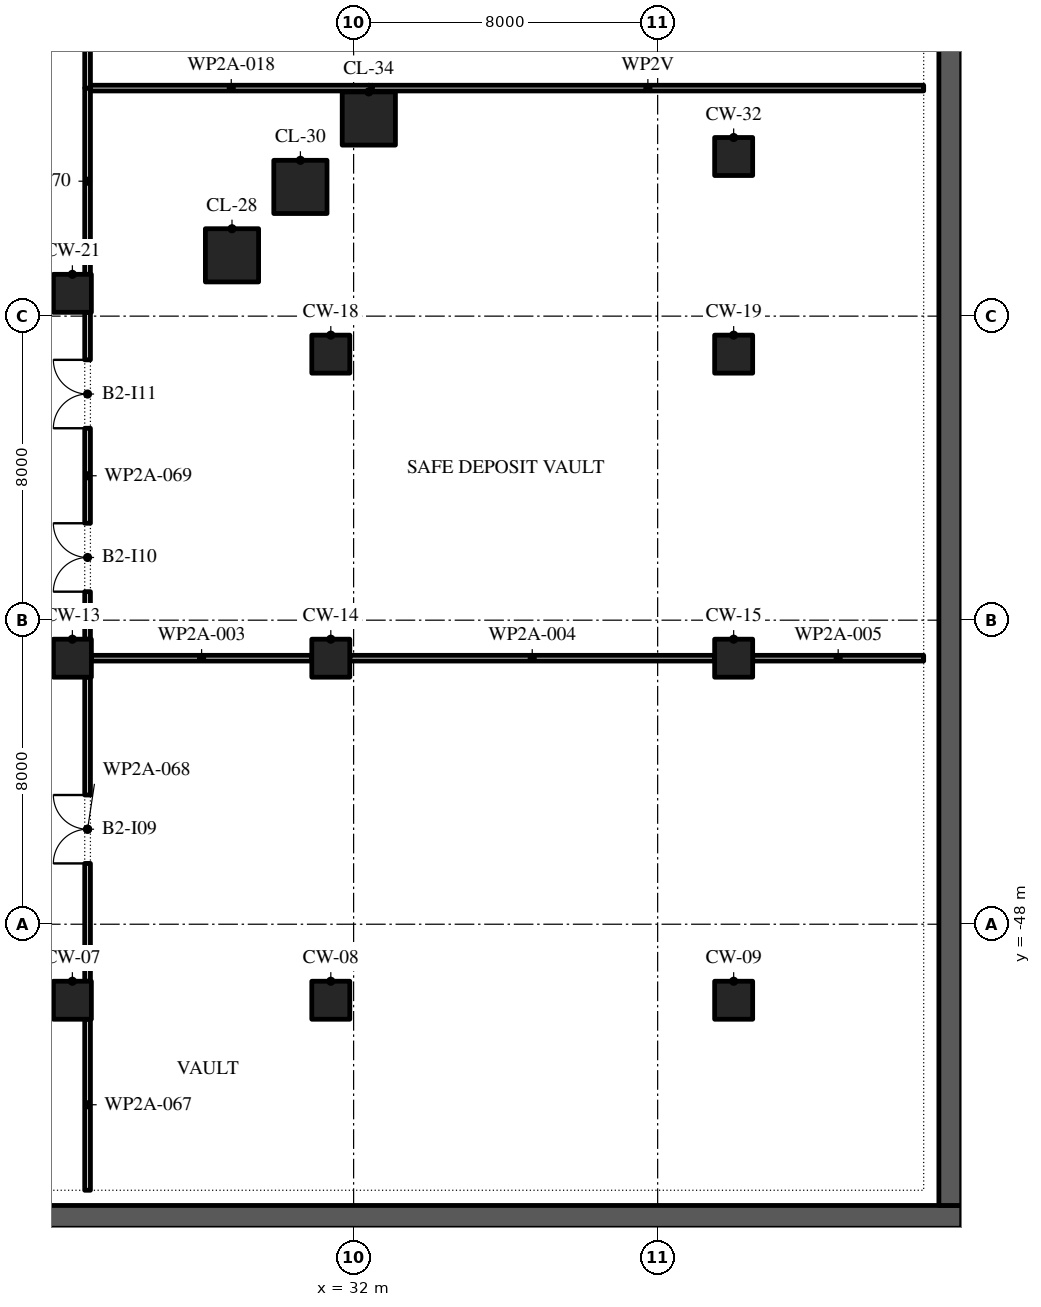
"""IFC4 building model, lengths in metres.
Left out: names, types, materials, properties, quantities, classifications, styles, units other than length and angle.
Written with IfcOpenShell. Run it as: python <this file> out.ifc"""

import sys

from ifc_helpers import new_model, si_unit, direction, frame, frame_2d, origin, origin_2d, place, context, subcontext, project, spatial, rectangle, extrude, element, fill, save


model = new_model("IFC4")
c1 = context("Model", 3, precision=1e-05, world=origin(), true_north=direction((0.0, 1.0)))
c2 = subcontext(c1, "Body", "Model", "MODEL_VIEW")
j1 = project(units=[si_unit("LENGTHUNIT", "METRE"), si_unit("PLANEANGLEUNIT", "RADIAN")], contexts=[c1])
p1 = place(None, origin())
s1 = spatial("IfcSite", under=j1, at=p1, CompositionType="ELEMENT")
p2 = place(p1, origin())
s2 = spatial("IfcBuilding", under=s1, at=p2, CompositionType="ELEMENT")
p3 = place(p2, frame((0.0, 0.0, -10.4)))
s3 = spatial("IfcBuildingStorey", under=s2, at=p3, CompositionType="ELEMENT", Elevation=-10.4)
p4 = place(p3, frame((-48.0, -55.7, -0.3), z_axis=(0.0, 0.0, 1.0), x_axis=(1.0, 0.0, 0.0)))
e1 = element("IfcWall", 1, at=p4, inside=s3, PredefinedType="SOLIDWALL", context=c2, shape_type="SweptSolid", body=[
    extrude(rectangle(XDim=96.0, YDim=0.6, at=frame_2d((48.0, 0.0))), origin(), (0.0, 0.0, 1.0), 5.5),
])
p5 = place(p3, frame((47.7, -55.4, -0.3), z_axis=(0.0, 0.0, 1.0), x_axis=(0.0, 1.0, 0.0)))
e2 = element("IfcWall", 2, at=p5, inside=s3, PredefinedType="SOLIDWALL", context=c2, shape_type="SweptSolid", body=[
    extrude(rectangle(XDim=94.8, YDim=0.6, at=frame_2d((47.4, 0.0))), origin(), (0.0, 0.0, 1.0), 5.5),
])
for number, where, z_axis, x_axis in (
    (3, (24.6, -50.0, -0.3), (0.0, 0.0, 1.0), (1.0, 0.0, 0.0)),
    (4, (31.4, -50.0, -0.3), (0.0, 0.0, 1.0), (1.0, 0.0, 0.0)),
    (5, (42.0, -50.0, -0.3), (0.0, 0.0, 1.0), (1.0, 0.0, 0.0)),
    (6, (24.6, -41.0, -0.3), (0.0, 0.0, 1.0), (1.0, 0.0, 0.0)),
    (7, (31.4, -41.0, -0.3), (0.0, 0.0, 1.0), (1.0, 0.0, 0.0)),
    (8, (42.0, -41.0, -0.3), (0.0, 0.0, 1.0), (1.0, 0.0, 0.0)),
    (9, (31.4, -33.0, -0.3), (0.0, 0.0, 1.0), (1.0, 0.0, 0.0)),
    (10, (42.0, -33.0, -0.3), (0.0, 0.0, 1.0), (1.0, 0.0, 0.0)),
    (11, (24.6, -31.4, -0.3), (0.0, 0.0, 1.0), (1.0, 0.0, 0.0)),
):
    element("IfcColumn", number, at=place(p3, frame(where, z_axis=z_axis, x_axis=x_axis)), inside=s3, PredefinedType="COLUMN", context=c2, shape_type="SweptSolid", body=[
        extrude(rectangle(XDim=1.0, YDim=1.0, at=origin_2d()), origin(), (0.0, 0.0, 1.0), 5.5),
    ])
for number, where, z_axis, x_axis in (
    (12, (28.8, -30.4, -0.3), (0.0, 0.0, 1.0), (1.0, 0.0, 0.0)),
    (13, (30.6, -28.6, -0.3), (0.0, 0.0, 1.0), (1.0, 0.0, 0.0)),
):
    element("IfcColumn", number, at=place(p3, frame(where, z_axis=z_axis, x_axis=x_axis)), inside=s3, PredefinedType="COLUMN", context=c2, shape_type="SweptSolid", body=[
        extrude(rectangle(XDim=1.4, YDim=1.4, at=origin_2d()), origin(), (0.0, 0.0, 1.0), 5.5),
    ])
p6 = place(p3, frame((42.0, -27.8, -0.3), z_axis=(0.0, 0.0, 1.0), x_axis=(1.0, 0.0, 0.0)))
e14 = element("IfcColumn", 14, at=p6, inside=s3, PredefinedType="COLUMN", context=c2, shape_type="SweptSolid", body=[
    extrude(rectangle(XDim=1.0, YDim=1.0, at=origin_2d()), origin(), (0.0, 0.0, 1.0), 5.5),
])
p7 = place(p3, frame((32.4, -26.8, -0.3), z_axis=(0.0, 0.0, 1.0), x_axis=(1.0, 0.0, 0.0)))
e15 = element("IfcColumn", 15, at=p7, inside=s3, PredefinedType="COLUMN", context=c2, shape_type="SweptSolid", body=[
    extrude(rectangle(XDim=1.4, YDim=1.4, at=origin_2d()), origin(), (0.0, 0.0, 1.0), 5.5),
])
p8 = place(p3, frame((25.1, -41.0, 0.0), z_axis=(0.0, 0.0, 1.0), x_axis=(1.0, 0.0, 0.0)))
e16 = element("IfcWall", 16, at=p8, inside=s3, PredefinedType="PARTITIONING", context=c2, shape_type="SweptSolid", body=[
    extrude(rectangle(XDim=5.8, YDim=0.15, at=frame_2d((2.9, 0.0))), origin(), (0.0, 0.0, 1.0), 4.9),
])
p9 = place(p3, frame((31.9, -41.0, 0.0), z_axis=(0.0, 0.0, 1.0), x_axis=(1.0, 0.0, 0.0)))
e17 = element("IfcWall", 17, at=p9, inside=s3, PredefinedType="PARTITIONING", context=c2, shape_type="SweptSolid", body=[
    extrude(rectangle(XDim=9.6, YDim=0.15, at=frame_2d((4.8, 0.0))), origin(), (0.0, 0.0, 1.0), 4.9),
])
p10 = place(p3, frame((42.5, -41.0, 0.0), z_axis=(0.0, 0.0, 1.0), x_axis=(1.0, 0.0, 0.0)))
e18 = element("IfcWall", 18, at=p10, inside=s3, PredefinedType="PARTITIONING", context=c2, shape_type="SweptSolid", body=[
    extrude(rectangle(XDim=4.5, YDim=0.15, at=frame_2d((2.25, 0.0))), origin(), (0.0, 0.0, 1.0), 4.9),
])
p11 = place(p3, frame((25.075, -26.0, 0.0), z_axis=(0.0, 0.0, 1.0), x_axis=(1.0, 0.0, 0.0)))
e19 = element("IfcWall", 19, at=p11, inside=s3, PredefinedType="PARTITIONING", context=c2, shape_type="SweptSolid", body=[
    extrude(rectangle(XDim=7.411, YDim=0.15, at=frame_2d((3.705, 0.0))), origin(), (0.0, 0.0, 1.0), 4.9),
])
p12 = place(p3, frame((25.0, -55.0, 0.0), z_axis=(0.0, 0.0, 1.0), x_axis=(0.0, 1.0, 0.0)))
e20 = element("IfcWall", 20, at=p12, inside=s3, PredefinedType="PARTITIONING", context=c2, shape_type="SweptSolid", body=[
    extrude(rectangle(XDim=4.5, YDim=0.15, at=frame_2d((2.25, 0.0))), origin(), (0.0, 0.0, 1.0), 4.9),
])
p13 = place(p3, frame((25.0, -49.5, 0.0), z_axis=(0.0, 0.0, 1.0), x_axis=(0.0, 1.0, 0.0)))
e21 = element("IfcWall", 21, at=p13, inside=s3, PredefinedType="PARTITIONING", context=c2, shape_type="SweptSolid", body=[
    extrude(rectangle(XDim=8.0, YDim=0.15, at=frame_2d((4.0, 0.0))), origin(), (0.0, 0.0, 1.0), 4.9),
])
p14 = place(p13, frame((3.1, 0.0, 0.0)))
e22 = element("IfcOpeningElement", 22, at=p14, cuts=e21, PredefinedType="OPENING", context=c2, shape_type="SweptSolid", body=[
    extrude(rectangle(XDim=1.8, YDim=2.1, at=frame_2d((0.9, 1.05))), frame((0.0, 0.085, 0.0), z_axis=(0.0, -1.0, 0.0), x_axis=(1.0, 0.0, 0.0)), (0.0, 0.0, 1.0), 0.17),
])
p15 = place(p3, frame((25.0, -40.5, 0.0), z_axis=(0.0, 0.0, 1.0), x_axis=(0.0, 1.0, 0.0)))
e23 = element("IfcWall", 23, at=p15, inside=s3, PredefinedType="PARTITIONING", context=c2, shape_type="SweptSolid", body=[
    extrude(rectangle(XDim=8.6, YDim=0.15, at=frame_2d((4.3, 0.0))), origin(), (0.0, 0.0, 1.0), 4.9),
])
p16 = place(p15, frame((1.25, 0.0, 0.0)))
e24 = element("IfcOpeningElement", 24, at=p16, cuts=e23, PredefinedType="OPENING", context=c2, shape_type="SweptSolid", body=[
    extrude(rectangle(XDim=1.8, YDim=2.1, at=frame_2d((0.9, 1.05))), frame((0.0, 0.085, 0.0), z_axis=(0.0, -1.0, 0.0), x_axis=(1.0, 0.0, 0.0)), (0.0, 0.0, 1.0), 0.17),
])
p17 = place(p15, frame((5.55, 0.0, 0.0)))
e25 = element("IfcOpeningElement", 25, at=p17, cuts=e23, PredefinedType="OPENING", context=c2, shape_type="SweptSolid", body=[
    extrude(rectangle(XDim=1.8, YDim=2.1, at=frame_2d((0.9, 1.05))), frame((0.0, 0.085, 0.0), z_axis=(0.0, -1.0, 0.0), x_axis=(1.0, 0.0, 0.0)), (0.0, 0.0, 1.0), 0.17),
])
p18 = place(p3, frame((25.0, -30.9, 0.0), z_axis=(0.0, 0.0, 1.0), x_axis=(0.0, 1.0, 0.0)))
e26 = element("IfcWall", 26, at=p18, inside=s3, PredefinedType="PARTITIONING", context=c2, shape_type="SweptSolid", body=[
    extrude(rectangle(XDim=4.9, YDim=0.15, at=frame_2d((2.45, 0.0))), origin(), (0.0, 0.0, 1.0), 4.9),
])
p19 = place(p3, frame((25.0, -26.0, 0.0), z_axis=(0.0, 0.0, 1.0), x_axis=(0.0, 1.0, 0.0)))
e27 = element("IfcWall", 27, at=p19, inside=s3, PredefinedType="PARTITIONING", context=c2, shape_type="SweptSolid", body=[
    extrude(rectangle(XDim=15.0, YDim=0.15, at=frame_2d((7.5, 0.0))), origin(), (0.0, 0.0, 1.0), 4.9),
])
p20 = place(p19, frame((2.85, 0.0, 0.0)))
e28 = element("IfcOpeningElement", 28, at=p20, cuts=e27, PredefinedType="OPENING", context=c2, shape_type="SweptSolid", body=[
    extrude(rectangle(XDim=1.8, YDim=2.1, at=frame_2d((0.9, 1.05))), frame((0.0, 0.085, 0.0), z_axis=(0.0, -1.0, 0.0), x_axis=(1.0, 0.0, 0.0)), (0.0, 0.0, 1.0), 0.17),
])
p21 = place(p19, frame((10.35, 0.0, 0.0)))
e29 = element("IfcOpeningElement", 29, at=p21, cuts=e27, PredefinedType="OPENING", context=c2, shape_type="SweptSolid", body=[
    extrude(rectangle(XDim=1.8, YDim=2.1, at=frame_2d((0.9, 1.05))), frame((0.0, 0.085, 0.0), z_axis=(0.0, -1.0, 0.0), x_axis=(1.0, 0.0, 0.0)), (0.0, 0.0, 1.0), 0.17),
])
p22 = place(p3, frame((32.486, -26.0, 0.0), z_axis=(0.0, 0.0, 1.0), x_axis=(1.0, 0.0, 0.0)))
e30 = element("IfcWall", 30, at=p22, inside=s3, PredefinedType="PARTITIONING", context=c2, shape_type="SweptSolid", body=[
    extrude(rectangle(XDim=14.514, YDim=0.15, at=frame_2d((7.257, 0.0))), origin(), (0.0, 0.0, 1.0), 4.443),
])
p23 = place(p14, origin())
e31 = element("IfcDoor", 31, at=p23, inside=s3, OperationType="SINGLE_SWING_LEFT", PredefinedType="DOOR", context=c2, shape_type="SweptSolid", body=[
    extrude(rectangle(XDim=1.8, YDim=2.1, at=frame_2d((0.9, 1.05))), frame((0.0, 0.025, 0.0), z_axis=(0.0, -1.0, 0.0), x_axis=(1.0, 0.0, 0.0)), (0.0, 0.0, 1.0), 0.05),
])
fill(e22, e31)
p24 = place(p16, origin())
e32 = element("IfcDoor", 32, at=p24, inside=s3, OperationType="SINGLE_SWING_RIGHT", PredefinedType="DOOR", context=c2, shape_type="SweptSolid", body=[
    extrude(rectangle(XDim=1.8, YDim=2.1, at=frame_2d((0.9, 1.05))), frame((0.0, 0.025, 0.0), z_axis=(0.0, -1.0, 0.0), x_axis=(1.0, 0.0, 0.0)), (0.0, 0.0, 1.0), 0.05),
])
fill(e24, e32)
p25 = place(p17, origin())
e33 = element("IfcDoor", 33, at=p25, inside=s3, OperationType="SINGLE_SWING_RIGHT", PredefinedType="DOOR", context=c2, shape_type="SweptSolid", body=[
    extrude(rectangle(XDim=1.8, YDim=2.1, at=frame_2d((0.9, 1.05))), frame((0.0, 0.025, 0.0), z_axis=(0.0, -1.0, 0.0), x_axis=(1.0, 0.0, 0.0)), (0.0, 0.0, 1.0), 0.05),
])
fill(e25, e33)
save(model, sys.argv[1])
